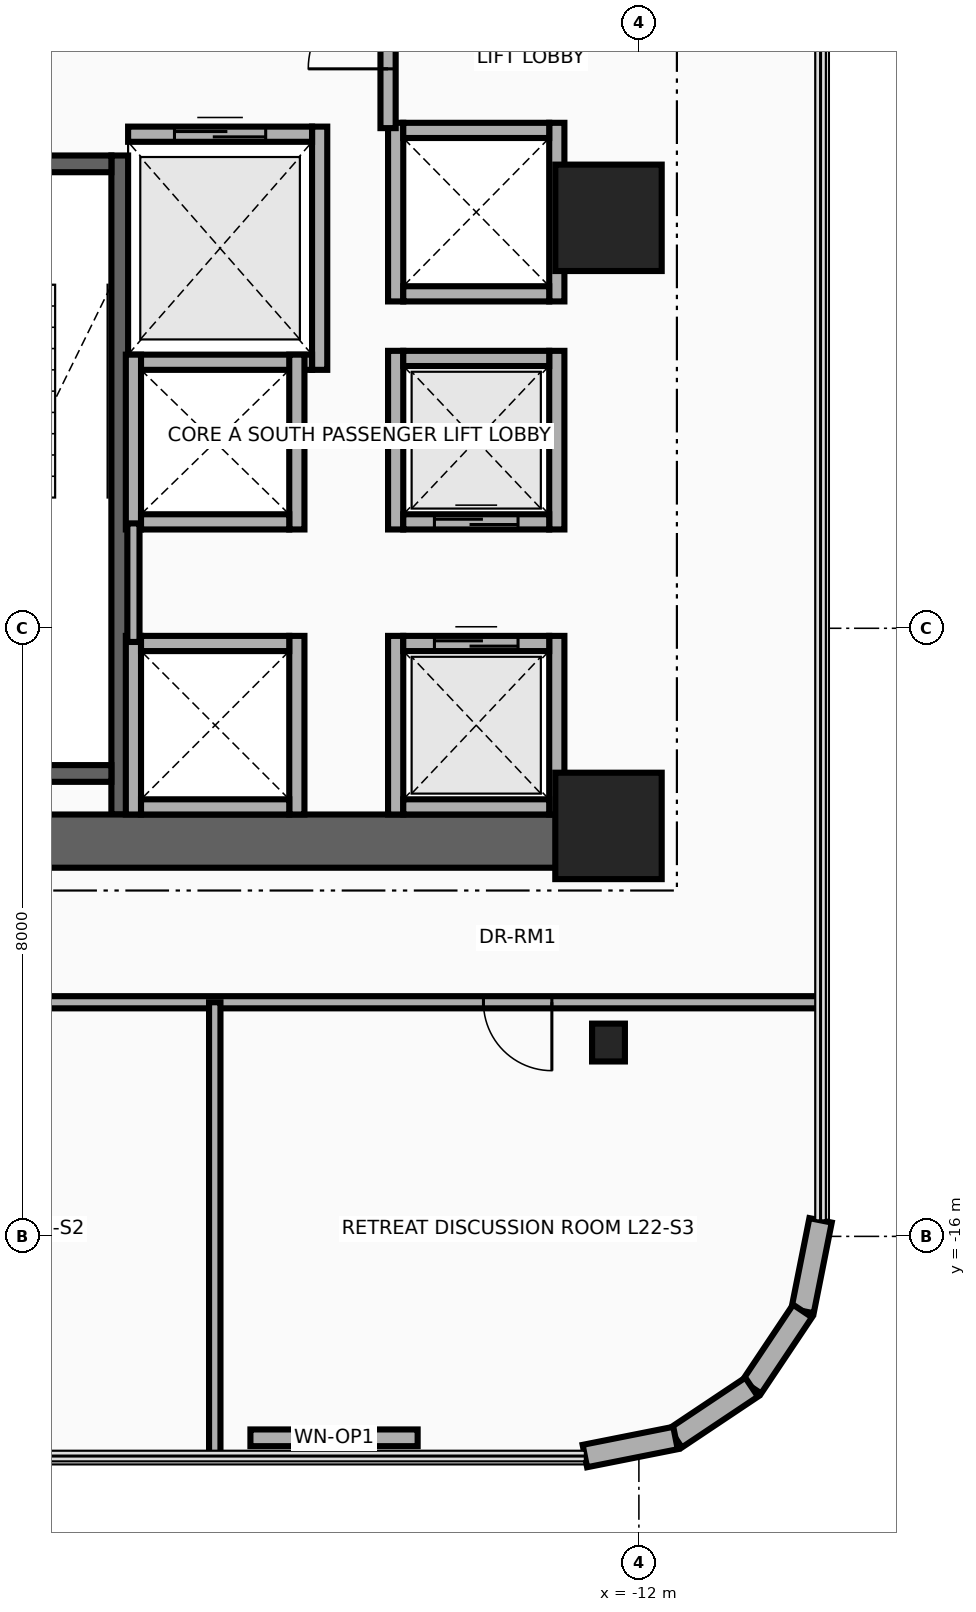
"""IFC4 building model, lengths in metres.
Left out: names, types, materials, properties, quantities, classifications, styles, units other than length and angle.
Written with IfcOpenShell. Run it as: python <this file> out.ifc"""

import sys

from ifc_helpers import new_model, si_unit, direction, frame, frame_2d, origin, origin_2d, place, context, subcontext, project, spatial, rectangle, i_section, extrude, source, transform, mapped, element, fill, save


model = new_model("IFC4")
c1 = context("Model", 3, precision=1e-05, world=origin(), true_north=direction((0.0, 1.0)))
c2 = subcontext(c1, "Body", "Model", "MODEL_VIEW")
j1 = project(units=[si_unit("LENGTHUNIT", "METRE"), si_unit("PLANEANGLEUNIT", "RADIAN")], contexts=[c1])
p1 = place(None, origin())
s1 = spatial("IfcSite", under=j1, at=p1, CompositionType="ELEMENT")
p2 = place(p1, origin())
s2 = spatial("IfcBuilding", under=s1, at=p2, CompositionType="ELEMENT")
p3 = place(p2, frame((0.0, 0.0, 88.9)))
s3 = spatial("IfcBuildingStorey", under=s2, at=p3, CompositionType="ELEMENT", Elevation=88.9)
p4 = place(p3, frame((-18.83, -10.45, 0.0), z_axis=(0.0, 0.0, 1.0), x_axis=(0.0, 1.0, 0.0)))
e1 = element("IfcWall", 1, at=p4, inside=s3, PredefinedType="SHEAR", context=c2, shape_type="SweptSolid", body=[
    extrude(rectangle(XDim=8.67, YDim=0.22, at=frame_2d((4.335, 0.0))), origin(), (0.0, 0.0, 1.0), 3.46),
])
p5 = place(p3, frame((-22.05, -9.91, 0.0), z_axis=(0.0, 0.0, 1.0), x_axis=(1.0, 0.0, 0.0)))
e2 = element("IfcWall", 2, at=p5, inside=s3, PredefinedType="SHEAR", context=c2, shape_type="SweptSolid", body=[
    extrude(rectangle(XDim=3.11, YDim=0.22, at=frame_2d((1.555, 0.0))), origin(), (0.0, 0.0, 1.0), 3.46),
])
p6 = place(p3, frame((-22.05, -1.89, 0.0), z_axis=(0.0, 0.0, 1.0), x_axis=(1.0, 0.0, 0.0)))
e3 = element("IfcWall", 3, at=p6, inside=s3, PredefinedType="SHEAR", context=c2, shape_type="SweptSolid", body=[
    extrude(rectangle(XDim=3.11, YDim=0.22, at=frame_2d((1.555, 0.0))), origin(), (0.0, 0.0, 1.0), 3.46),
])
p7 = place(p6, frame((1.0, 0.0, 0.0)))
e4 = element("IfcOpeningElement", 4, at=p7, cuts=e3, PredefinedType="OPENING", context=c2, shape_type="SweptSolid", body=[
    extrude(rectangle(XDim=1.1, YDim=2.15, at=frame_2d((0.55, 1.075))), frame((0.0, 0.125, 0.0), z_axis=(0.0, -1.0, 0.0), x_axis=(1.0, 0.0, 0.0)), (0.0, 0.0, 1.0), 0.25),
])
p8 = place(p3, frame((-22.65, -10.8, 0.0), z_axis=(0.0, 0.0, 1.0), x_axis=(1.0, 0.0, 0.0)))
e5 = element("IfcWall", 5, at=p8, inside=s3, PredefinedType="SHEAR", context=c2, shape_type="SweptSolid", body=[
    extrude(rectangle(XDim=10.25, YDim=0.7, at=frame_2d((5.125, 0.0))), origin(), (0.0, 0.0, 1.0), 3.46),
])
m1 = source(origin(), c2, "Body", "SweptSolid", [
    extrude(rectangle(XDim=1.4, YDim=1.4, at=origin_2d()), origin(), (0.0, 0.0, 1.0), 3.7),
])
for number, where, z_axis, x_axis in (
    (6, (-12.4, -10.6, 0.0), (0.0, 0.0, 1.0), (1.0, 0.0, 0.0)),
    (7, (-12.4, -2.6, 0.0), (0.0, 0.0, 1.0), (1.0, 0.0, 0.0)),
):
    element("IfcColumn", number, at=place(p3, frame(where, z_axis=z_axis, x_axis=x_axis)), inside=s3, PredefinedType="COLUMN", context=c2, shape_type="MappedRepresentation", body=[
        mapped(m1, transform((0.0, 0.0, 0.0), x_axis=(1.0, 0.0, 0.0), y_axis=(0.0, 1.0, 0.0), z_axis=(0.0, 0.0, 1.0), scale=1.0)),
    ])
m2 = source(origin(), c2, "Body", "SweptSolid", [
    extrude(i_section(OverallWidth=0.432, OverallDepth=0.498, WebThickness=0.056, FlangeThickness=0.089, at=origin_2d()), origin(), (0.0, 0.0, 1.0), 3.7),
])
p9 = place(p3, frame((-12.4, -13.45, 0.0), z_axis=(0.0, 0.0, 1.0), x_axis=(1.0, 0.0, 0.0)))
e8 = element("IfcColumn", 8, at=p9, inside=s3, PredefinedType="COLUMN", context=c2, shape_type="MappedRepresentation", body=[
    mapped(m2, transform((0.0, 0.0, 0.0), x_axis=(1.0, 0.0, 0.0), y_axis=(0.0, 1.0, 0.0), z_axis=(0.0, 0.0, 1.0), scale=1.0)),
])
p10 = place(p3, frame((-9.61, -15.789, 0.0), z_axis=(0.0, 0.0, 1.0), x_axis=(-0.194996050505, -0.980804027463, 0.0)))
e9 = element("IfcWall", 9, at=p10, inside=s3, PredefinedType="SOLIDWALL", context=c2, shape_type="SweptSolid", body=[
    extrude(rectangle(XDim=1.216, YDim=0.3, at=frame_2d((0.608, 0.0))), origin(), (0.0, 0.0, 1.0), 3.46),
])
for number, where, z_axis, x_axis in (
    (10, (-9.847, -16.982, 0.0), (0.0, 0.0, 1.0), (-0.556, -0.831, 0.0)),
    (11, (-10.517, -17.983, 0.0), (0.0, 0.0, 1.0), (-0.831, -0.556, 0.0)),
):
    element("IfcWall", number, at=place(p3, frame(where, z_axis=z_axis, x_axis=x_axis)), inside=s3, PredefinedType="SOLIDWALL", context=c2, shape_type="SweptSolid", body=[
        extrude(rectangle(XDim=1.205, YDim=0.3, at=frame_2d((0.603, 0.0))), origin(), (0.0, 0.0, 1.0), 3.46),
    ])
p11 = place(p3, frame((-11.518, -18.653, 0.0), z_axis=(0.0, 0.0, 1.0), x_axis=(-0.980804027463, -0.194996050505, 0.0)))
e12 = element("IfcWall", 12, at=p11, inside=s3, PredefinedType="SOLIDWALL", context=c2, shape_type="SweptSolid", body=[
    extrude(rectangle(XDim=1.216, YDim=0.3, at=frame_2d((0.608, 0.0))), origin(), (0.0, 0.0, 1.0), 3.46),
])
p12 = place(p3, frame((-14.911, -18.65, 0.0), z_axis=(0.0, 0.0, 1.0), x_axis=(-1.0, 0.0, 0.0)))
e13 = element("IfcWall", 13, at=p12, inside=s3, PredefinedType="SOLIDWALL", context=c2, shape_type="SweptSolid", body=[
    extrude(rectangle(XDim=2.2, YDim=0.22, at=frame_2d((1.1, 0.0))), origin(), (0.0, 0.0, 1.0), 3.46),
])
p13 = place(p12, frame((0.65, 0.0, 0.95)))
e14 = element("IfcOpeningElement", 14, at=p13, cuts=e13, PredefinedType="OPENING", context=c2, shape_type="SweptSolid", body=[
    extrude(rectangle(XDim=0.9, YDim=1.3, at=frame_2d((0.45, 0.65))), frame((0.0, 0.125, 0.0), z_axis=(0.0, -1.0, 0.0), x_axis=(1.0, 0.0, 0.0)), (0.0, 0.0, 1.0), 0.25),
])
p14 = place(p3, frame((-16.2, -4.6, 0.0), z_axis=(0.0, 0.0, 1.0), x_axis=(0.0, 1.0, 0.0)))
e15 = element("IfcWall", 15, at=p14, inside=s3, PredefinedType="MOVABLE", context=c2, shape_type="SweptSolid", body=[
    extrude(rectangle(XDim=3.2, YDim=0.2, at=frame_2d((1.6, 0.0))), origin(), (0.0, 0.0, 1.0), 3.46),
])
p15 = place(p3, frame((-18.72, -4.5, 0.0), z_axis=(0.0, 0.0, 1.0), x_axis=(1.0, 0.0, 0.0)))
e16 = element("IfcWall", 16, at=p15, inside=s3, PredefinedType="MOVABLE", context=c2, shape_type="SweptSolid", body=[
    extrude(rectangle(XDim=2.42, YDim=0.2, at=frame_2d((1.21, 0.0))), origin(), (0.0, 0.0, 1.0), 3.46),
])
p16 = place(p3, frame((-18.72, -1.5, 0.0), z_axis=(0.0, 0.0, 1.0), x_axis=(1.0, 0.0, 0.0)))
e17 = element("IfcWall", 17, at=p16, inside=s3, PredefinedType="MOVABLE", context=c2, shape_type="SweptSolid", body=[
    extrude(rectangle(XDim=2.42, YDim=0.2, at=frame_2d((1.21, 0.0))), origin(), (0.0, 0.0, 1.0), 3.46),
])
p17 = place(p16, frame((0.61, 0.0, 0.0)))
e18 = element("IfcOpeningElement", 18, at=p17, cuts=e17, PredefinedType="OPENING", context=c2, shape_type="SweptSolid", body=[
    extrude(rectangle(XDim=1.2, YDim=2.1, at=frame_2d((0.6, 1.05))), frame((0.0, 0.115, 0.0), z_axis=(0.0, -1.0, 0.0), x_axis=(1.0, 0.0, 0.0)), (0.0, 0.0, 1.0), 0.23),
])
for number, where, z_axis, x_axis in (
    (19, (-15.2, -10.45, 0.0), (0.0, 0.0, 1.0), (0.0, 1.0, 0.0)),
    (20, (-13.08, -10.45, 0.0), (0.0, 0.0, 1.0), (0.0, 1.0, 0.0)),
):
    element("IfcWall", number, at=place(p3, frame(where, z_axis=z_axis, x_axis=x_axis)), inside=s3, PredefinedType="MOVABLE", context=c2, shape_type="SweptSolid", body=[
        extrude(rectangle(XDim=2.35, YDim=0.2, at=frame_2d((1.175, 0.0))), origin(), (0.0, 0.0, 1.0), 2.583),
    ])
p18 = place(p3, frame((-15.1, -10.35, 0.0), z_axis=(0.0, 0.0, 1.0), x_axis=(1.0, 0.0, 0.0)))
e21 = element("IfcWall", 21, at=p18, inside=s3, PredefinedType="MOVABLE", context=c2, shape_type="SweptSolid", body=[
    extrude(rectangle(XDim=1.92, YDim=0.2, at=frame_2d((0.96, 0.0))), origin(), (0.0, 0.0, 1.0), 2.583),
])
p19 = place(p3, frame((-15.1, -8.2, 0.0), z_axis=(0.0, 0.0, 1.0), x_axis=(1.0, 0.0, 0.0)))
e22 = element("IfcWall", 22, at=p19, inside=s3, PredefinedType="MOVABLE", context=c2, shape_type="SweptSolid", body=[
    extrude(rectangle(XDim=1.92, YDim=0.2, at=frame_2d((0.96, 0.0))), origin(), (0.0, 0.0, 1.0), 3.46),
])
p20 = place(p19, frame((0.41, 0.0, 0.0)))
e23 = element("IfcOpeningElement", 23, at=p20, cuts=e22, PredefinedType="OPENING", context=c2, shape_type="SweptSolid", body=[
    extrude(rectangle(XDim=1.1, YDim=2.1, at=frame_2d((0.55, 1.05))), frame((0.0, 0.115, 0.0), z_axis=(0.0, -1.0, 0.0), x_axis=(1.0, 0.0, 0.0)), (0.0, 0.0, 1.0), 0.23),
])
for number, where, z_axis, x_axis in (
    (24, (-15.2, -6.7, 0.0), (0.0, 0.0, 1.0), (0.0, 1.0, 0.0)),
    (25, (-13.08, -6.7, 0.0), (0.0, 0.0, 1.0), (0.0, 1.0, 0.0)),
):
    element("IfcWall", number, at=place(p3, frame(where, z_axis=z_axis, x_axis=x_axis)), inside=s3, PredefinedType="MOVABLE", context=c2, shape_type="SweptSolid", body=[
        extrude(rectangle(XDim=2.35, YDim=0.2, at=frame_2d((1.175, 0.0))), origin(), (0.0, 0.0, 1.0), 3.46),
    ])
p21 = place(p3, frame((-15.1, -6.6, 0.0), z_axis=(0.0, 0.0, 1.0), x_axis=(1.0, 0.0, 0.0)))
e26 = element("IfcWall", 26, at=p21, inside=s3, PredefinedType="MOVABLE", context=c2, shape_type="SweptSolid", body=[
    extrude(rectangle(XDim=1.92, YDim=0.2, at=frame_2d((0.96, 0.0))), origin(), (0.0, 0.0, 1.0), 3.46),
])
p22 = place(p21, frame((0.41, 0.0, 0.0)))
e27 = element("IfcOpeningElement", 27, at=p22, cuts=e26, PredefinedType="OPENING", context=c2, shape_type="SweptSolid", body=[
    extrude(rectangle(XDim=1.1, YDim=2.1, at=frame_2d((0.55, 1.05))), frame((0.0, 0.115, 0.0), z_axis=(0.0, -1.0, 0.0), x_axis=(1.0, 0.0, 0.0)), (0.0, 0.0, 1.0), 0.23),
])
p23 = place(p3, frame((-15.1, -4.45, 0.0), z_axis=(0.0, 0.0, 1.0), x_axis=(1.0, 0.0, 0.0)))
e28 = element("IfcWall", 28, at=p23, inside=s3, PredefinedType="MOVABLE", context=c2, shape_type="SweptSolid", body=[
    extrude(rectangle(XDim=1.92, YDim=0.2, at=frame_2d((0.96, 0.0))), origin(), (0.0, 0.0, 1.0), 3.46),
])
for number, where, z_axis, x_axis in (
    (29, (-18.65, -10.45, 0.0), (0.0, 0.0, 1.0), (0.0, 1.0, 0.0)),
    (30, (-16.5, -10.45, 0.0), (0.0, 0.0, 1.0), (0.0, 1.0, 0.0)),
):
    element("IfcWall", number, at=place(p3, frame(where, z_axis=z_axis, x_axis=x_axis)), inside=s3, PredefinedType="MOVABLE", context=c2, shape_type="SweptSolid", body=[
        extrude(rectangle(XDim=2.35, YDim=0.2, at=frame_2d((1.175, 0.0))), origin(), (0.0, 0.0, 1.0), 2.583),
    ])
p24 = place(p3, frame((-18.55, -10.35, 0.0), z_axis=(0.0, 0.0, 1.0), x_axis=(1.0, 0.0, 0.0)))
e31 = element("IfcWall", 31, at=p24, inside=s3, PredefinedType="MOVABLE", context=c2, shape_type="SweptSolid", body=[
    extrude(rectangle(XDim=1.95, YDim=0.2, at=frame_2d((0.975, 0.0))), origin(), (0.0, 0.0, 1.0), 2.583),
])
p25 = place(p3, frame((-18.55, -8.2, 0.0), z_axis=(0.0, 0.0, 1.0), x_axis=(1.0, 0.0, 0.0)))
e32 = element("IfcWall", 32, at=p25, inside=s3, PredefinedType="MOVABLE", context=c2, shape_type="SweptSolid", body=[
    extrude(rectangle(XDim=1.95, YDim=0.2, at=frame_2d((0.975, 0.0))), origin(), (0.0, 0.0, 1.0), 3.46),
])
for number, where, z_axis, x_axis in (
    (33, (-18.65, -6.7, 0.0), (0.0, 0.0, 1.0), (0.0, 1.0, 0.0)),
    (34, (-16.5, -6.7, 0.0), (0.0, 0.0, 1.0), (0.0, 1.0, 0.0)),
):
    element("IfcWall", number, at=place(p3, frame(where, z_axis=z_axis, x_axis=x_axis)), inside=s3, PredefinedType="MOVABLE", context=c2, shape_type="SweptSolid", body=[
        extrude(rectangle(XDim=2.3, YDim=0.2, at=frame_2d((1.15, 0.0))), origin(), (0.0, 0.0, 1.0), 3.46),
    ])
p26 = place(p3, frame((-18.55, -6.6, 0.0), z_axis=(0.0, 0.0, 1.0), x_axis=(1.0, 0.0, 0.0)))
e35 = element("IfcWall", 35, at=p26, inside=s3, PredefinedType="MOVABLE", context=c2, shape_type="SweptSolid", body=[
    extrude(rectangle(XDim=1.95, YDim=0.2, at=frame_2d((0.975, 0.0))), origin(), (0.0, 0.0, 1.0), 3.46),
])
for number, where, z_axis, x_axis in (
    (36, (-15.2, -3.7, 0.0), (0.0, 0.0, 1.0), (0.0, 1.0, 0.0)),
    (37, (-13.08, -3.7, 0.0), (0.0, 0.0, 1.0), (0.0, 1.0, 0.0)),
):
    element("IfcWall", number, at=place(p3, frame(where, z_axis=z_axis, x_axis=x_axis)), inside=s3, PredefinedType="MOVABLE", context=c2, shape_type="SweptSolid", body=[
        extrude(rectangle(XDim=2.35, YDim=0.2, at=frame_2d((1.175, 0.0))), origin(), (0.0, 0.0, 1.0), 3.46),
    ])
for number, where, z_axis, x_axis in (
    (38, (-15.1, -3.6, 0.0), (0.0, 0.0, 1.0), (1.0, 0.0, 0.0)),
    (39, (-15.1, -1.45, 0.0), (0.0, 0.0, 1.0), (1.0, 0.0, 0.0)),
):
    element("IfcWall", number, at=place(p3, frame(where, z_axis=z_axis, x_axis=x_axis)), inside=s3, PredefinedType="MOVABLE", context=c2, shape_type="SweptSolid", body=[
        extrude(rectangle(XDim=1.92, YDim=0.2, at=frame_2d((0.96, 0.0))), origin(), (0.0, 0.0, 1.0), 3.46),
    ])
p27 = place(p3, frame((-15.3, -1.42, 0.0), z_axis=(0.0, 0.0, 1.0), x_axis=(0.0, 1.0, 0.0)))
e40 = element("IfcWall", 40, at=p27, inside=s3, PredefinedType="PARTITIONING", context=c2, shape_type="SweptSolid", body=[
    extrude(rectangle(XDim=2.67, YDim=0.2, at=frame_2d((1.335, 0.0))), origin(), (0.0, 0.0, 1.0), 3.46),
])
p28 = place(p27, frame((0.78, 0.0, 0.0)))
e41 = element("IfcOpeningElement", 41, at=p28, cuts=e40, PredefinedType="OPENING", context=c2, shape_type="SweptSolid", body=[
    extrude(rectangle(XDim=1.05, YDim=2.15, at=frame_2d((0.525, 1.075))), frame((0.0, 0.115, 0.0), z_axis=(0.0, -1.0, 0.0), x_axis=(1.0, 0.0, 0.0)), (0.0, 0.0, 1.0), 0.23),
])
p29 = place(p3, frame((-18.65, -8.18, 0.0), z_axis=(0.0, 0.0, 1.0), x_axis=(0.0, 1.0, 0.0)))
e42 = element("IfcWall", 42, at=p29, inside=s3, PredefinedType="PARTITIONING", context=c2, shape_type="SweptSolid", body=[
    extrude(rectangle(XDim=1.56, YDim=0.16, at=frame_2d((0.78, 0.0))), origin(), (0.0, 0.0, 1.0), 3.46),
])
p30 = place(p3, frame((-31.89, -12.92, 0.0), z_axis=(0.0, 0.0, 1.0), x_axis=(1.0, 0.0, 0.0)))
e43 = element("IfcWall", 43, at=p30, inside=s3, PredefinedType="PARTITIONING", context=c2, shape_type="SweptSolid", body=[
    extrude(rectangle(XDim=22.28, YDim=0.16, at=frame_2d((11.14, 0.0))), origin(), (0.0, 0.0, 1.0), 2.834),
])
p31 = place(p30, frame((2.665, 0.0, 0.0)))
e44 = element("IfcOpeningElement", 44, at=p31, cuts=e43, PredefinedType="OPENING", context=c2, shape_type="SweptSolid", body=[
    extrude(rectangle(XDim=0.9, YDim=2.1, at=frame_2d((0.45, 1.05))), frame((0.0, 0.095, 0.0), z_axis=(0.0, -1.0, 0.0), x_axis=(1.0, 0.0, 0.0)), (0.0, 0.0, 1.0), 0.19),
])
p32 = place(p30, frame((9.82, 0.0, 0.0)))
e45 = element("IfcOpeningElement", 45, at=p32, cuts=e43, PredefinedType="OPENING", context=c2, shape_type="SweptSolid", body=[
    extrude(rectangle(XDim=0.9, YDim=2.1, at=frame_2d((0.45, 1.05))), frame((0.0, 0.095, 0.0), z_axis=(0.0, -1.0, 0.0), x_axis=(1.0, 0.0, 0.0)), (0.0, 0.0, 1.0), 0.19),
])
p33 = place(p30, frame((17.845, 0.0, 0.0)))
e46 = element("IfcOpeningElement", 46, at=p33, cuts=e43, PredefinedType="OPENING", context=c2, shape_type="SweptSolid", body=[
    extrude(rectangle(XDim=0.9, YDim=2.1, at=frame_2d((0.45, 1.05))), frame((0.0, 0.095, 0.0), z_axis=(0.0, -1.0, 0.0), x_axis=(1.0, 0.0, 0.0)), (0.0, 0.0, 1.0), 0.19),
])
p34 = place(p3, frame((-17.58, -18.89, 0.0), z_axis=(0.0, 0.0, 1.0), x_axis=(0.0, 1.0, 0.0)))
e47 = element("IfcWall", 47, at=p34, inside=s3, PredefinedType="PARTITIONING", context=c2, shape_type="SweptSolid", body=[
    extrude(rectangle(XDim=5.97, YDim=0.15, at=frame_2d((2.985, 0.0))), origin(), (0.0, 0.0, 1.0), 2.896),
])
p35 = place(p13, origin())
e48 = element("IfcWindow", 48, at=p35, inside=s3, PartitioningType="SINGLE_PANEL", PredefinedType="WINDOW", context=c2, shape_type="SweptSolid", body=[
    extrude(rectangle(XDim=0.9, YDim=1.3, at=frame_2d((0.45, 0.65))), frame((0.0, 0.03, 0.0), z_axis=(0.0, -1.0, 0.0), x_axis=(1.0, 0.0, 0.0)), (0.0, 0.0, 1.0), 0.06),
])
fill(e14, e48)
p36 = place(p17, origin())
e49 = element("IfcDoor", 49, at=p36, inside=s3, OperationType="DOUBLE_DOOR_SLIDING", PredefinedType="DOOR", context=c2, shape_type="SweptSolid", body=[
    extrude(rectangle(XDim=1.2, YDim=2.1, at=frame_2d((0.6, 1.05))), frame((0.0, 0.025, 0.0), z_axis=(0.0, -1.0, 0.0), x_axis=(1.0, 0.0, 0.0)), (0.0, 0.0, 1.0), 0.05),
])
fill(e18, e49)
p37 = place(p20, origin())
e50 = element("IfcDoor", 50, at=p37, inside=s3, OperationType="DOUBLE_DOOR_SLIDING", PredefinedType="DOOR", context=c2, shape_type="SweptSolid", body=[
    extrude(rectangle(XDim=1.1, YDim=2.1, at=frame_2d((0.55, 1.05))), frame((0.0, 0.025, 0.0), z_axis=(0.0, -1.0, 0.0), x_axis=(1.0, 0.0, 0.0)), (0.0, 0.0, 1.0), 0.05),
])
fill(e23, e50)
p38 = place(p22, origin())
e51 = element("IfcDoor", 51, at=p38, inside=s3, OperationType="DOUBLE_DOOR_SLIDING", PredefinedType="DOOR", context=c2, shape_type="SweptSolid", body=[
    extrude(rectangle(XDim=1.1, YDim=2.1, at=frame_2d((0.55, 1.05))), frame((0.0, 0.025, 0.0), z_axis=(0.0, -1.0, 0.0), x_axis=(1.0, 0.0, 0.0)), (0.0, 0.0, 1.0), 0.05),
])
fill(e27, e51)
p39 = place(p28, origin())
e52 = element("IfcDoor", 52, at=p39, inside=s3, OperationType="SINGLE_SWING_RIGHT", PredefinedType="DOOR", context=c2, shape_type="SweptSolid", body=[
    extrude(rectangle(XDim=1.05, YDim=2.15, at=frame_2d((0.525, 1.075))), frame((0.0, 0.025, 0.0), z_axis=(0.0, -1.0, 0.0), x_axis=(1.0, 0.0, 0.0)), (0.0, 0.0, 1.0), 0.05),
])
fill(e41, e52)
p40 = place(p33, frame((0.9, 0.0, 0.0), z_axis=(0.0, 0.0, 1.0), x_axis=(-1.0, 0.0, 0.0)))
e53 = element("IfcDoor", 53, at=p40, inside=s3, OperationType="SINGLE_SWING_LEFT", PredefinedType="DOOR", context=c2, shape_type="SweptSolid", body=[
    extrude(rectangle(XDim=0.9, YDim=2.1, at=frame_2d((0.45, 1.05))), frame((0.0, 0.025, 0.0), z_axis=(0.0, -1.0, 0.0), x_axis=(1.0, 0.0, 0.0)), (0.0, 0.0, 1.0), 0.05),
])
fill(e46, e53)
save(model, sys.argv[1])
